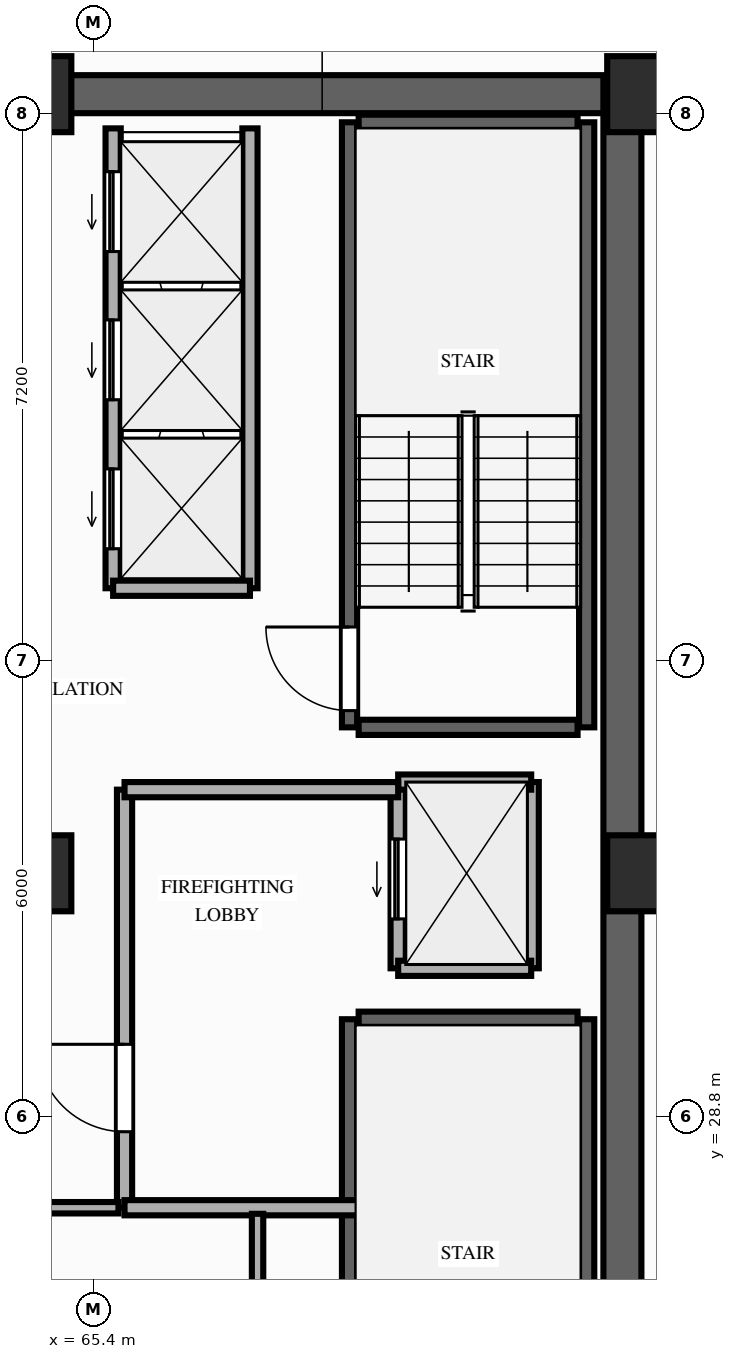
"""IFC4 building model, lengths in metres.
Left out: names, types, materials, properties, quantities, classifications, styles, units other than length and angle.
Written with IfcOpenShell. Run it as: python <this file> out.ifc"""

import sys

from ifc_helpers import new_model, si_unit, direction, frame, frame_2d, origin, origin_2d, place, context, subcontext, project, spatial, rectangle, extrude, element, fill, save


model = new_model("IFC4")
c1 = context("Model", 3, precision=1e-05, world=origin(), true_north=direction((0.0, 1.0)))
c2 = subcontext(c1, "Body", "Model", "MODEL_VIEW")
j1 = project(units=[si_unit("LENGTHUNIT", "METRE"), si_unit("PLANEANGLEUNIT", "RADIAN")], contexts=[c1])
p1 = place(None, origin())
s1 = spatial("IfcSite", under=j1, at=p1, CompositionType="ELEMENT")
p2 = place(p1, origin())
s2 = spatial("IfcBuilding", under=s1, at=p2, CompositionType="ELEMENT")
p3 = place(p2, frame((0.0, 0.0, 56.4)))
s3 = spatial("IfcBuildingStorey", under=s2, at=p3, CompositionType="ELEMENT", Elevation=56.4)
for number, where, z_axis, x_axis in (
    (1, (64.6, 32.0, 0.0), (0.0, 0.0, 1.0), (1.0, 0.0, 0.0)),
    (2, (72.65, 32.0, 0.0), (0.0, 0.0, 1.0), (1.0, 0.0, 0.0)),
    (3, (64.6, 42.25, 0.0), (0.0, 0.0, 1.0), (1.0, 0.0, 0.0)),
    (4, (72.65, 42.25, 0.0), (0.0, 0.0, 1.0), (1.0, 0.0, 0.0)),
):
    element("IfcColumn", number, at=place(p3, frame(where, z_axis=z_axis, x_axis=x_axis)), inside=s3, PredefinedType="COLUMN", context=c2, shape_type="SweptSolid", body=[
        extrude(rectangle(XDim=1.0, YDim=1.0, at=origin_2d()), origin(), (0.0, 0.0, 1.0), 3.2),
    ])
p4 = place(p3, frame((72.35, 22.0, 0.0), z_axis=(0.0, 0.0, 1.0), x_axis=(0.0, 1.0, 0.0)))
e5 = element("IfcWall", 5, at=p4, inside=s3, PredefinedType="SHEAR", context=c2, shape_type="SweptSolid", body=[
    extrude(rectangle(XDim=20.25, YDim=0.5, at=frame_2d((10.125, 0.0))), origin(), (0.0, 0.0, 1.0), 3.02),
])
p5 = place(p3, frame((64.6, 42.25, 0.0), z_axis=(0.0, 0.0, 1.0), x_axis=(1.0, 0.0, 0.0)))
e6 = element("IfcWall", 6, at=p5, inside=s3, PredefinedType="SHEAR", context=c2, shape_type="SweptSolid", body=[
    extrude(rectangle(XDim=7.5, YDim=0.5, at=frame_2d((3.75, 0.0))), origin(), (0.0, 0.0, 1.0), 3.02),
])
p6 = place(p3, frame((68.76, 22.26, 0.0), z_axis=(0.0, 0.0, 1.0), x_axis=(0.0, 1.0, 0.0)))
e7 = element("IfcWall", 7, at=p6, inside=s3, PredefinedType="SHEAR", context=c2, shape_type="SweptSolid", body=[
    extrude(rectangle(XDim=7.82, YDim=0.2, at=frame_2d((3.91, 0.0))), origin(), (0.0, 0.0, 1.0), 3.02),
])
p7 = place(p6, frame((0.22, 0.0, 0.0)))
e8 = element("IfcOpeningElement", 8, at=p7, cuts=e7, PredefinedType="OPENING", context=c2, shape_type="SweptSolid", body=[
    extrude(rectangle(XDim=1.1, YDim=2.15, at=frame_2d((0.55, 1.075))), frame((0.0, 0.11, 0.0), z_axis=(0.0, -1.0, 0.0), x_axis=(1.0, 0.0, 0.0)), (0.0, 0.0, 1.0), 0.22),
])
p8 = place(p3, frame((71.88, 22.26, 0.0), z_axis=(0.0, 0.0, 1.0), x_axis=(0.0, 1.0, 0.0)))
e9 = element("IfcWall", 9, at=p8, inside=s3, PredefinedType="SHEAR", context=c2, shape_type="SweptSolid", body=[
    extrude(rectangle(XDim=7.82, YDim=0.2, at=frame_2d((3.91, 0.0))), origin(), (0.0, 0.0, 1.0), 3.02),
])
p9 = place(p3, frame((68.88, 30.08, 0.0), z_axis=(0.0, 0.0, 1.0), x_axis=(1.0, 0.0, 0.0)))
e10 = element("IfcWall", 10, at=p9, inside=s3, PredefinedType="SHEAR", context=c2, shape_type="SweptSolid", body=[
    extrude(rectangle(XDim=2.88, YDim=0.2, at=frame_2d((1.44, 0.0))), origin(), (0.0, 0.0, 1.0), 3.02),
])
p10 = place(p3, frame((68.76, 33.92, 0.0), z_axis=(0.0, 0.0, 1.0), x_axis=(0.0, 1.0, 0.0)))
e11 = element("IfcWall", 11, at=p10, inside=s3, PredefinedType="SHEAR", context=c2, shape_type="SweptSolid", body=[
    extrude(rectangle(XDim=7.96, YDim=0.2, at=frame_2d((3.98, 0.0))), origin(), (0.0, 0.0, 1.0), 3.02),
])
p11 = place(p10, frame((0.22, 0.0, 0.0)))
e12 = element("IfcOpeningElement", 12, at=p11, cuts=e11, PredefinedType="OPENING", context=c2, shape_type="SweptSolid", body=[
    extrude(rectangle(XDim=1.1, YDim=2.15, at=frame_2d((0.55, 1.075))), frame((0.0, 0.11, 0.0), z_axis=(0.0, -1.0, 0.0), x_axis=(1.0, 0.0, 0.0)), (0.0, 0.0, 1.0), 0.22),
])
p12 = place(p3, frame((71.88, 33.92, 0.0), z_axis=(0.0, 0.0, 1.0), x_axis=(0.0, 1.0, 0.0)))
e13 = element("IfcWall", 13, at=p12, inside=s3, PredefinedType="SHEAR", context=c2, shape_type="SweptSolid", body=[
    extrude(rectangle(XDim=7.96, YDim=0.2, at=frame_2d((3.98, 0.0))), origin(), (0.0, 0.0, 1.0), 3.02),
])
for number, where, z_axis, x_axis in (
    (14, (68.88, 41.88, 0.0), (0.0, 0.0, 1.0), (1.0, 0.0, 0.0)),
    (15, (68.88, 33.92, 0.0), (0.0, 0.0, 1.0), (1.0, 0.0, 0.0)),
):
    element("IfcWall", number, at=place(p3, frame(where, z_axis=z_axis, x_axis=x_axis)), inside=s3, PredefinedType="SHEAR", context=c2, shape_type="SweptSolid", body=[
        extrude(rectangle(XDim=2.88, YDim=0.2, at=frame_2d((1.44, 0.0))), origin(), (0.0, 0.0, 1.0), 3.02),
    ])
p13 = place(p3, frame((65.65, 35.75, 0.0), z_axis=(0.0, 0.0, 1.0), x_axis=(0.0, 1.0, 0.0)))
e16 = element("IfcWall", 16, at=p13, inside=s3, PredefinedType="MOVABLE", context=c2, shape_type="SweptSolid", body=[
    extrude(rectangle(XDim=6.05, YDim=0.2, at=frame_2d((3.025, 0.0))), origin(), (0.0, 0.0, 1.0), 3.02),
])
p14 = place(p13, frame((0.52, 0.0, 0.0)))
e17 = element("IfcOpeningElement", 17, at=p14, cuts=e16, PredefinedType="OPENING", context=c2, shape_type="SweptSolid", body=[
    extrude(rectangle(XDim=1.05, YDim=2.15, at=frame_2d((0.525, 1.075))), frame((0.0, 0.11, 0.0), z_axis=(0.0, -1.0, 0.0), x_axis=(1.0, 0.0, 0.0)), (0.0, 0.0, 1.0), 0.22),
])
p15 = place(p13, frame((2.48, 0.0, 0.0)))
e18 = element("IfcOpeningElement", 18, at=p15, cuts=e16, PredefinedType="OPENING", context=c2, shape_type="SweptSolid", body=[
    extrude(rectangle(XDim=1.05, YDim=2.15, at=frame_2d((0.525, 1.075))), frame((0.0, 0.11, 0.0), z_axis=(0.0, -1.0, 0.0), x_axis=(1.0, 0.0, 0.0)), (0.0, 0.0, 1.0), 0.22),
])
p16 = place(p13, frame((4.43, 0.0, 0.0)))
e19 = element("IfcOpeningElement", 19, at=p16, cuts=e16, PredefinedType="OPENING", context=c2, shape_type="SweptSolid", body=[
    extrude(rectangle(XDim=1.05, YDim=2.15, at=frame_2d((0.525, 1.075))), frame((0.0, 0.11, 0.0), z_axis=(0.0, -1.0, 0.0), x_axis=(1.0, 0.0, 0.0)), (0.0, 0.0, 1.0), 0.22),
])
p17 = place(p3, frame((67.45, 35.75, 0.0), z_axis=(0.0, 0.0, 1.0), x_axis=(0.0, 1.0, 0.0)))
e20 = element("IfcWall", 20, at=p17, inside=s3, PredefinedType="MOVABLE", context=c2, shape_type="SweptSolid", body=[
    extrude(rectangle(XDim=6.05, YDim=0.2, at=frame_2d((3.025, 0.0))), origin(), (0.0, 0.0, 1.0), 3.02),
])
p18 = place(p3, frame((65.65, 35.75, 0.0), z_axis=(0.0, 0.0, 1.0), x_axis=(1.0, 0.0, 0.0)))
e21 = element("IfcWall", 21, at=p18, inside=s3, PredefinedType="MOVABLE", context=c2, shape_type="SweptSolid", body=[
    extrude(rectangle(XDim=1.8, YDim=0.2, at=frame_2d((0.9, 0.0))), origin(), (0.0, 0.0, 1.0), 3.02),
])
p19 = place(p3, frame((69.4, 30.75, 0.0), z_axis=(0.0, 0.0, 1.0), x_axis=(0.0, 1.0, 0.0)))
e22 = element("IfcWall", 22, at=p19, inside=s3, PredefinedType="MOVABLE", context=c2, shape_type="SweptSolid", body=[
    extrude(rectangle(XDim=2.45, YDim=0.2, at=frame_2d((1.225, 0.0))), origin(), (0.0, 0.0, 1.0), 3.02),
])
p20 = place(p19, frame((0.65, 0.0, 0.0)))
e23 = element("IfcOpeningElement", 23, at=p20, cuts=e22, PredefinedType="OPENING", context=c2, shape_type="SweptSolid", body=[
    extrude(rectangle(XDim=1.05, YDim=2.15, at=frame_2d((0.525, 1.075))), frame((0.0, 0.11, 0.0), z_axis=(0.0, -1.0, 0.0), x_axis=(1.0, 0.0, 0.0)), (0.0, 0.0, 1.0), 0.22),
])
p21 = place(p3, frame((71.15, 30.75, 0.0), z_axis=(0.0, 0.0, 1.0), x_axis=(0.0, 1.0, 0.0)))
e24 = element("IfcWall", 24, at=p21, inside=s3, PredefinedType="MOVABLE", context=c2, shape_type="SweptSolid", body=[
    extrude(rectangle(XDim=2.45, YDim=0.2, at=frame_2d((1.225, 0.0))), origin(), (0.0, 0.0, 1.0), 3.02),
])
for number, where, z_axis, x_axis in (
    (25, (69.4, 33.2, 0.0), (0.0, 0.0, 1.0), (1.0, 0.0, 0.0)),
    (26, (69.4, 30.75, 0.0), (0.0, 0.0, 1.0), (1.0, 0.0, 0.0)),
):
    element("IfcWall", number, at=place(p3, frame(where, z_axis=z_axis, x_axis=x_axis)), inside=s3, PredefinedType="MOVABLE", context=c2, shape_type="SweptSolid", body=[
        extrude(rectangle(XDim=1.75, YDim=0.2, at=frame_2d((0.875, 0.0))), origin(), (0.0, 0.0, 1.0), 3.02),
    ])
p22 = place(p3, frame((65.8, 27.6, 0.0), z_axis=(0.0, 0.0, 1.0), x_axis=(0.0, 1.0, 0.0)))
e27 = element("IfcWall", 27, at=p22, inside=s3, PredefinedType="PARTITIONING", context=c2, shape_type="SweptSolid", body=[
    extrude(rectangle(XDim=5.5, YDim=0.2, at=frame_2d((2.75, 0.0))), origin(), (0.0, 0.0, 1.0), 3.02),
])
p23 = place(p22, frame((1.0, 0.0, 0.0)))
e28 = element("IfcOpeningElement", 28, at=p23, cuts=e27, PredefinedType="OPENING", context=c2, shape_type="SweptSolid", body=[
    extrude(rectangle(XDim=1.15, YDim=2.15, at=frame_2d((0.575, 1.075))), frame((0.0, 0.11, 0.0), z_axis=(0.0, -1.0, 0.0), x_axis=(1.0, 0.0, 0.0)), (0.0, 0.0, 1.0), 0.22),
])
p24 = place(p3, frame((65.8, 33.1, 0.0), z_axis=(0.0, 0.0, 1.0), x_axis=(1.0, 0.0, 0.0)))
e29 = element("IfcWall", 29, at=p24, inside=s3, PredefinedType="PARTITIONING", context=c2, shape_type="SweptSolid", body=[
    extrude(rectangle(XDim=3.6, YDim=0.2, at=frame_2d((1.8, 0.0))), origin(), (0.0, 0.0, 1.0), 3.02),
])
p25 = place(p3, frame((65.8, 27.6, 0.0), z_axis=(0.0, 0.0, 1.0), x_axis=(1.0, 0.0, 0.0)))
e30 = element("IfcWall", 30, at=p25, inside=s3, PredefinedType="PARTITIONING", context=c2, shape_type="SweptSolid", body=[
    extrude(rectangle(XDim=3.4, YDim=0.2, at=frame_2d((1.7, 0.0))), origin(), (0.0, 0.0, 1.0), 3.02),
])
p26 = place(p3, frame((67.55, 21.05, 0.0), z_axis=(0.0, 0.0, 1.0), x_axis=(0.0, 1.0, 0.0)))
e31 = element("IfcWall", 31, at=p26, inside=s3, PredefinedType="PARTITIONING", context=c2, shape_type="SweptSolid", body=[
    extrude(rectangle(XDim=6.47, YDim=0.15, at=frame_2d((3.235, 0.0))), origin(), (0.0, 0.0, 1.0), 2.51),
])
p27 = place(p3, frame((64.25, 27.6, 0.0), z_axis=(0.0, 0.0, 1.0), x_axis=(1.0, 0.0, 0.0)))
e32 = element("IfcWall", 32, at=p27, inside=s3, PredefinedType="PARTITIONING", context=c2, shape_type="SweptSolid", body=[
    extrude(rectangle(XDim=1.47, YDim=0.15, at=frame_2d((0.735, 0.0))), origin(), (0.0, 0.0, 1.0), 2.51),
])
p28 = place(p11, origin())
e33 = element("IfcDoor", 33, at=p28, inside=s3, OperationType="SINGLE_SWING_RIGHT", PredefinedType="DOOR", context=c2, shape_type="SweptSolid", body=[
    extrude(rectangle(XDim=1.1, YDim=2.15, at=frame_2d((0.55, 1.075))), frame((0.0, 0.025, 0.0), z_axis=(0.0, -1.0, 0.0), x_axis=(1.0, 0.0, 0.0)), (0.0, 0.0, 1.0), 0.05),
])
fill(e12, e33)
p29 = place(p14, origin())
e34 = element("IfcDoor", 34, at=p29, inside=s3, OperationType="SLIDING_TO_LEFT", PredefinedType="DOOR", context=c2, shape_type="SweptSolid", body=[
    extrude(rectangle(XDim=1.05, YDim=2.15, at=frame_2d((0.525, 1.075))), frame((0.0, 0.025, 0.0), z_axis=(0.0, -1.0, 0.0), x_axis=(1.0, 0.0, 0.0)), (0.0, 0.0, 1.0), 0.05),
])
fill(e17, e34)
p30 = place(p15, origin())
e35 = element("IfcDoor", 35, at=p30, inside=s3, OperationType="SLIDING_TO_LEFT", PredefinedType="DOOR", context=c2, shape_type="SweptSolid", body=[
    extrude(rectangle(XDim=1.05, YDim=2.15, at=frame_2d((0.525, 1.075))), frame((0.0, 0.025, 0.0), z_axis=(0.0, -1.0, 0.0), x_axis=(1.0, 0.0, 0.0)), (0.0, 0.0, 1.0), 0.05),
])
fill(e18, e35)
p31 = place(p16, origin())
e36 = element("IfcDoor", 36, at=p31, inside=s3, OperationType="SLIDING_TO_LEFT", PredefinedType="DOOR", context=c2, shape_type="SweptSolid", body=[
    extrude(rectangle(XDim=1.05, YDim=2.15, at=frame_2d((0.525, 1.075))), frame((0.0, 0.025, 0.0), z_axis=(0.0, -1.0, 0.0), x_axis=(1.0, 0.0, 0.0)), (0.0, 0.0, 1.0), 0.05),
])
fill(e19, e36)
p32 = place(p20, origin())
e37 = element("IfcDoor", 37, at=p32, inside=s3, OperationType="SLIDING_TO_LEFT", PredefinedType="DOOR", context=c2, shape_type="SweptSolid", body=[
    extrude(rectangle(XDim=1.05, YDim=2.15, at=frame_2d((0.525, 1.075))), frame((0.0, 0.025, 0.0), z_axis=(0.0, -1.0, 0.0), x_axis=(1.0, 0.0, 0.0)), (0.0, 0.0, 1.0), 0.05),
])
fill(e23, e37)
p33 = place(p23, origin())
e38 = element("IfcDoor", 38, at=p33, inside=s3, OperationType="SINGLE_SWING_RIGHT", PredefinedType="DOOR", context=c2, shape_type="SweptSolid", body=[
    extrude(rectangle(XDim=1.15, YDim=2.15, at=frame_2d((0.575, 1.075))), frame((0.0, 0.025, 0.0), z_axis=(0.0, -1.0, 0.0), x_axis=(1.0, 0.0, 0.0)), (0.0, 0.0, 1.0), 0.05),
])
fill(e28, e38)
save(model, sys.argv[1])
